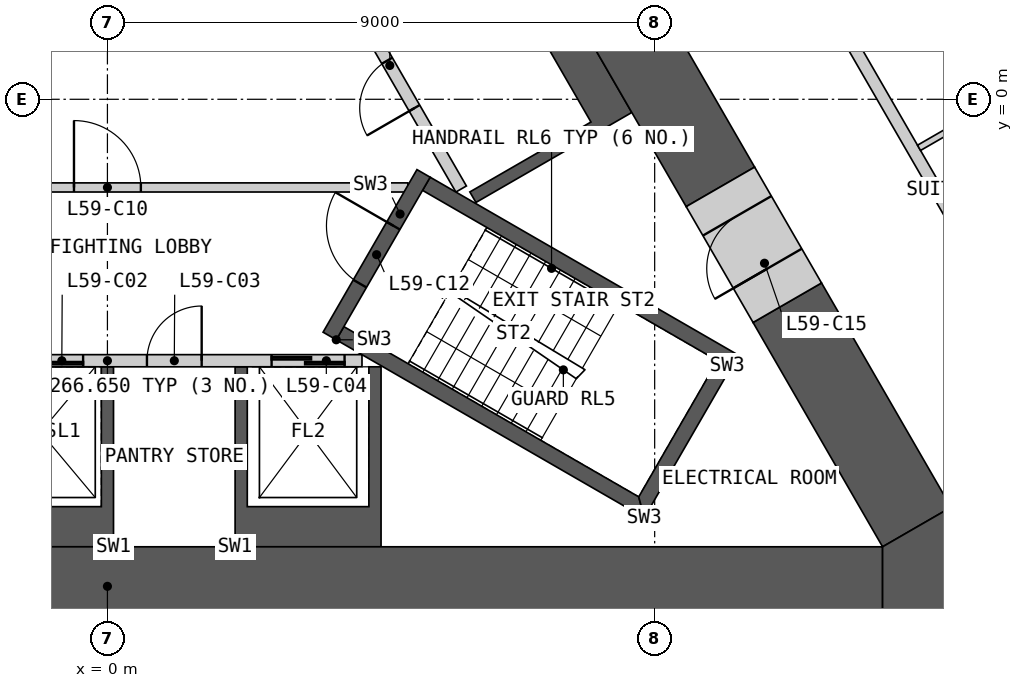
"""IFC4 building model, lengths in metres.
Left out: names, types, materials, properties, quantities, classifications, styles, units other than length and angle.
Written with IfcOpenShell. Run it as: python <this file> out.ifc"""

import sys

from ifc_helpers import new_model, si_unit, direction, frame, frame_2d, origin, place, context, subcontext, project, spatial, polyline, rectangle, outline, extrude, element, fill, save


model = new_model("IFC4")
c1 = context("Model", 3, precision=1e-05, world=origin(), true_north=direction((0.0, 1.0)))
c2 = subcontext(c1, "Body", "Model", "MODEL_VIEW")
j1 = project(units=[si_unit("LENGTHUNIT", "METRE"), si_unit("PLANEANGLEUNIT", "RADIAN")], contexts=[c1])
p1 = place(None, origin())
s1 = spatial("IfcSite", under=j1, at=p1, CompositionType="ELEMENT")
p2 = place(p1, origin())
s2 = spatial("IfcBuilding", under=s1, at=p2, CompositionType="ELEMENT")
p3 = place(p2, frame((0.0, 0.0, 263.4)))
s3 = spatial("IfcBuildingStorey", under=s2, at=p3, CompositionType="ELEMENT", Elevation=263.4)
p4 = place(p3, origin())
e1 = element("IfcWall", 1, at=p4, inside=s3, PredefinedType="SHEAR", context=c2, shape_type="SweptSolid", body=[
    extrude(outline(polyline([(0.1, -7.36), (-4.5, -7.36), (-4.5, -4.4), (-4.3, -4.4), (-4.3, -6.7), (-2.3, -6.7), (-2.3, -4.4), (-2.1, -4.4), (-2.1, -6.7), (-0.1, -6.7), (-0.1, -4.4), (0.1, -4.4), (0.1, -7.36)])), origin(), (0.0, 0.0, 1.0), 3.25),
])
p5 = place(p3, origin())
e2 = element("IfcWall", 2, at=p5, inside=s3, PredefinedType="SHEAR", context=c2, shape_type="SweptSolid", body=[
    extrude(outline(polyline([(2.1, -7.36), (2.1, -4.4), (2.3, -4.4), (2.3, -6.7), (4.3, -6.7), (4.3, -4.4), (4.5, -4.4), (4.5, -7.36), (2.1, -7.36)])), origin(), (0.0, 0.0, 1.0), 3.25),
])
p6 = place(p3, frame((-4.187, -4.3, 0.0), z_axis=(0.0, 0.0, 1.0), x_axis=(1.0, 0.0, 0.0)))
e3 = element("IfcWall", 3, at=p6, inside=s3, PredefinedType="SOLIDWALL", context=c2, shape_type="SweptSolid", body=[
    extrude(rectangle(XDim=8.373, YDim=0.2, at=frame_2d((4.187, 0.0))), origin(), (0.0, 0.0, 1.0), 3.25),
])
p7 = place(p6, frame((0.287, 0.0, 0.0)))
e4 = element("IfcOpeningElement", 4, at=p7, cuts=e3, PredefinedType="OPENING", context=c2, shape_type="SweptSolid", body=[
    extrude(rectangle(XDim=1.2, YDim=2.1, at=frame_2d((0.6, 1.05))), frame((0.0, 0.11, 0.0), z_axis=(0.0, -1.0, 0.0), x_axis=(1.0, 0.0, 0.0)), (0.0, 0.0, 1.0), 0.22),
])
p8 = place(p6, frame((2.387, 0.0, 0.0)))
e5 = element("IfcOpeningElement", 5, at=p8, cuts=e3, PredefinedType="OPENING", context=c2, shape_type="SweptSolid", body=[
    extrude(rectangle(XDim=1.4, YDim=2.1, at=frame_2d((0.7, 1.05))), frame((0.0, 0.11, 0.0), z_axis=(0.0, -1.0, 0.0), x_axis=(1.0, 0.0, 0.0)), (0.0, 0.0, 1.0), 0.22),
])
p9 = place(p6, frame((4.837, 0.0, 0.0)))
e6 = element("IfcOpeningElement", 6, at=p9, cuts=e3, PredefinedType="OPENING", context=c2, shape_type="SweptSolid", body=[
    extrude(rectangle(XDim=0.9, YDim=2.1, at=frame_2d((0.45, 1.05))), frame((0.0, 0.11, 0.0), z_axis=(0.0, -1.0, 0.0), x_axis=(1.0, 0.0, 0.0)), (0.0, 0.0, 1.0), 0.22),
])
p10 = place(p6, frame((6.887, 0.0, 0.0)))
e7 = element("IfcOpeningElement", 7, at=p10, cuts=e3, PredefinedType="OPENING", context=c2, shape_type="SweptSolid", body=[
    extrude(rectangle(XDim=1.2, YDim=2.1, at=frame_2d((0.6, 1.05))), frame((0.0, 0.11, 0.0), z_axis=(0.0, -1.0, 0.0), x_axis=(1.0, 0.0, 0.0)), (0.0, 0.0, 1.0), 0.22),
])
p11 = place(p3, origin())
e8 = element("IfcWall", 8, at=p11, inside=s3, PredefinedType="SHEAR", context=c2, shape_type="SweptSolid", body=[
    extrude(outline(polyline([(6.324, 3.767), (8.624, -0.217), (8.231, -0.444), (6.061, -1.697), (5.96, -1.524), (7.952, -0.374), (5.852, 3.263), (3.861, 2.113), (3.76, 2.287), (5.931, 3.54), (6.324, 3.767)])), origin(), (0.0, 0.0, 1.0), 3.25),
])
p12 = place(p3, frame((5.817, -1.476, 0.0), z_axis=(0.0, 0.0, 1.0), x_axis=(-0.500002616675, 0.866023893041, 0.0)))
e9 = element("IfcWall", 9, at=p12, inside=s3, PredefinedType="SOLIDWALL", context=c2, shape_type="SweptSolid", body=[
    extrude(rectangle(XDim=8.373, YDim=0.2, at=frame_2d((4.187, 0.0))), origin(), (0.0, 0.0, 1.0), 3.25),
])
p13 = place(p12, frame((1.537, 0.0, 0.0)))
e10 = element("IfcOpeningElement", 10, at=p13, cuts=e9, PredefinedType="OPENING", context=c2, shape_type="SweptSolid", body=[
    extrude(rectangle(XDim=0.9, YDim=2.1, at=frame_2d((0.45, 1.05))), frame((0.0, 0.11, 0.0), z_axis=(0.0, -1.0, 0.0), x_axis=(1.0, 0.0, 0.0)), (0.0, 0.0, 1.0), 0.22),
])
p14 = place(p12, frame((4.837, 0.0, 0.0)))
e11 = element("IfcOpeningElement", 11, at=p14, cuts=e9, PredefinedType="OPENING", context=c2, shape_type="SweptSolid", body=[
    extrude(rectangle(XDim=0.9, YDim=2.1, at=frame_2d((0.45, 1.05))), frame((0.0, 0.11, 0.0), z_axis=(0.0, -1.0, 0.0), x_axis=(1.0, 0.0, 0.0)), (0.0, 0.0, 1.0), 0.22),
])
p15 = place(p12, frame((6.937, 0.0, 0.0)))
e12 = element("IfcOpeningElement", 12, at=p15, cuts=e9, PredefinedType="OPENING", context=c2, shape_type="SweptSolid", body=[
    extrude(rectangle(XDim=1.1, YDim=2.1, at=frame_2d((0.55, 1.05))), frame((0.0, 0.11, 0.0), z_axis=(0.0, -1.0, 0.0), x_axis=(1.0, 0.0, 0.0)), (0.0, 0.0, 1.0), 0.22),
])
p16 = place(p3, frame((-4.941, -1.45, 0.0), z_axis=(0.0, 0.0, 1.0), x_axis=(1.0, 0.0, 0.0)))
e13 = element("IfcWall", 13, at=p16, inside=s3, PredefinedType="PARTITIONING", context=c2, shape_type="SweptSolid", body=[
    extrude(rectangle(XDim=9.882, YDim=0.15, at=frame_2d((4.941, 0.0))), origin(), (0.0, 0.0, 1.0), 3.25),
])
p17 = place(p16, frame((4.391, 0.0, 0.0)))
e14 = element("IfcOpeningElement", 14, at=p17, cuts=e13, PredefinedType="OPENING", context=c2, shape_type="SweptSolid", body=[
    extrude(rectangle(XDim=1.1, YDim=2.1, at=frame_2d((0.55, 1.05))), frame((0.0, 0.085, 0.0), z_axis=(0.0, -1.0, 0.0), x_axis=(1.0, 0.0, 0.0)), (0.0, 0.0, 1.0), 0.17),
])
p18 = place(p3, origin())
e15 = element("IfcWall", 15, at=p18, inside=s3, PredefinedType="SHEAR", context=c2, shape_type="SweptSolid", body=[
    extrude(outline(polyline([(3.763, -3.956), (8.83, -6.881), (8.738, -6.539), (3.888, -3.739), (3.763, -3.956)])), origin(), (0.0, 0.0, 1.0), 3.25),
])
p19 = place(p3, origin())
e16 = element("IfcWall", 16, at=p19, inside=s3, PredefinedType="SHEAR", context=c2, shape_type="SweptSolid", body=[
    extrude(outline(polyline([(8.83, -6.881), (10.374, -4.206), (10.032, -4.298), (8.738, -6.539), (8.83, -6.881)])), origin(), (0.0, 0.0, 1.0), 3.25),
])
p20 = place(p3, origin())
e17 = element("IfcWall", 17, at=p20, inside=s3, PredefinedType="SHEAR", context=c2, shape_type="SweptSolid", body=[
    extrude(outline(polyline([(10.032, -4.298), (10.374, -4.206), (5.307, -1.281), (5.182, -1.498), (10.032, -4.298)])), origin(), (0.0, 0.0, 1.0), 3.25),
])
p21 = place(p3, frame((3.655, -3.893, 0.0), z_axis=(0.0, 0.0, 1.0), x_axis=(0.499982516597, 0.866035497597, 0.0)))
e18 = element("IfcWall", 18, at=p21, inside=s3, PredefinedType="SHEAR", context=c2, shape_type="SweptSolid", body=[
    extrude(rectangle(XDim=3.088, YDim=0.25, at=frame_2d((1.544, 0.0))), origin(), (0.0, 0.0, 1.0), 3.25),
])
p22 = place(p21, frame((0.994, 0.0, 0.0)))
e19 = element("IfcOpeningElement", 19, at=p22, cuts=e18, PredefinedType="OPENING", context=c2, shape_type="SweptSolid", body=[
    extrude(rectangle(XDim=1.1, YDim=2.1, at=frame_2d((0.55, 1.05))), frame((0.0, 0.135, 0.0), z_axis=(0.0, -1.0, 0.0), x_axis=(1.0, 0.0, 0.0)), (0.0, 0.0, 1.0), 0.27),
])
p23 = place(p3, frame((-12.748, -8.01, 0.0), z_axis=(0.0, 0.0, 1.0), x_axis=(1.0, 0.0, 0.0)))
e20 = element("IfcWall", 20, at=p23, inside=s3, PredefinedType="SHEAR", context=c2, shape_type="SweptSolid", body=[
    extrude(rectangle(XDim=25.497, YDim=1.3, at=frame_2d((12.748, 0.0))), origin(), (0.0, 0.0, 1.0), 3.25),
])
p24 = place(p3, frame((10.081, -1.441, 0.0), z_axis=(0.0, 0.0, 1.0), x_axis=(-0.500012180433, 0.866018371294, 0.0)))
e21 = element("IfcWall", 21, at=p24, inside=s3, PredefinedType="SHEAR", context=c2, shape_type="SweptSolid", body=[
    extrude(rectangle(XDim=15.05, YDim=1.3, at=frame_2d((7.525, 0.0))), origin(), (0.0, 0.0, 1.0), 3.25),
])
p25 = place(p3, frame((13.311, -7.035, 0.0), z_axis=(0.0, 0.0, 1.0), x_axis=(-0.500003555838, 0.866023350811, 0.0)))
e22 = element("IfcWall", 22, at=p25, inside=s3, PredefinedType="SHEAR", context=c2, shape_type="SweptSolid", body=[
    extrude(rectangle(XDim=4.26, YDim=1.3, at=frame_2d((2.13, 0.0))), origin(), (0.0, 0.0, 1.0), 3.25),
])
p26 = place(p3, origin())
e23 = element("IfcWall", 23, at=p26, inside=s3, PredefinedType="SHEAR", context=c2, shape_type="SweptSolid", body=[
    extrude(outline(polyline([(12.748, -8.66), (12.748, -7.36), (13.874, -6.71), (15.0, -8.66), (12.748, -8.66)])), origin(), (0.0, 0.0, 1.0), 3.25),
])
p27 = place(p3, frame((11.181, -3.346, 0.0), z_axis=(0.0, 0.0, 1.0), x_axis=(-0.499946605688, 0.86605622881, 0.0)))
e24 = element("IfcWall", 24, at=p27, inside=s3, PredefinedType="SHEAR", context=c2, shape_type="SweptSolid", body=[
    extrude(rectangle(XDim=2.2, YDim=1.3, at=frame_2d((1.1, 0.0))), origin(), (0.0, 0.0, 1.0), 3.25),
])
p28 = place(p27, frame((0.65, 0.0, 0.0)))
e25 = element("IfcOpeningElement", 25, at=p28, cuts=e24, PredefinedType="OPENING", context=c2, shape_type="SweptSolid", body=[
    extrude(rectangle(XDim=1.0, YDim=2.1, at=frame_2d((0.5, 1.05))), frame((0.0, 0.66, 0.0), z_axis=(0.0, -1.0, 0.0), x_axis=(1.0, 0.0, 0.0)), (0.0, 0.0, 1.0), 1.32),
])
p29 = place(p3, frame((9.699, 5.321, 0.0), z_axis=(0.0, 0.0, 1.0), x_axis=(0.49998193945, -0.866035830797, 0.0)))
e26 = element("IfcWall", 26, at=p29, inside=s3, PredefinedType="PARTITIONING", context=c2, shape_type="SweptSolid", body=[
    extrude(rectangle(XDim=9.094, YDim=0.2, at=frame_2d((4.547, 0.0))), origin(), (0.0, 0.0, 1.0), 3.25),
])
p30 = place(p29, frame((1.162, 0.0, 0.0)))
e27 = element("IfcOpeningElement", 27, at=p30, cuts=e26, PredefinedType="OPENING", context=c2, shape_type="SweptSolid", body=[
    extrude(rectangle(XDim=1.1, YDim=2.1, at=frame_2d((0.55, 1.05))), frame((0.0, 0.11, 0.0), z_axis=(0.0, -1.0, 0.0), x_axis=(1.0, 0.0, 0.0)), (0.0, 0.0, 1.0), 0.22),
])
p31 = place(p3, frame((13.348, -0.799, 0.0), z_axis=(0.0, 0.0, 1.0), x_axis=(0.866014668023, 0.500018594424, 0.0)))
e28 = element("IfcWall", 28, at=p31, inside=s3, PredefinedType="PARTITIONING", context=c2, shape_type="SweptSolid", body=[
    extrude(rectangle(XDim=2.45, YDim=0.1, at=frame_2d((1.225, 0.0))), origin(), (0.0, 0.0, 1.0), 2.404),
])
p32 = place(p8, origin())
e29 = element("IfcDoor", 29, at=p32, inside=s3, OperationType="SLIDING_TO_LEFT", PredefinedType="DOOR", context=c2, shape_type="SweptSolid", body=[
    extrude(rectangle(XDim=1.4, YDim=2.1, at=frame_2d((0.7, 1.05))), frame((0.0, 0.025, 0.0), z_axis=(0.0, -1.0, 0.0), x_axis=(1.0, 0.0, 0.0)), (0.0, 0.0, 1.0), 0.05),
])
fill(e5, e29)
p33 = place(p9, origin())
e30 = element("IfcDoor", 30, at=p33, inside=s3, OperationType="SINGLE_SWING_RIGHT", PredefinedType="DOOR", context=c2, shape_type="SweptSolid", body=[
    extrude(rectangle(XDim=0.9, YDim=2.1, at=frame_2d((0.45, 1.05))), frame((0.0, 0.025, 0.0), z_axis=(0.0, -1.0, 0.0), x_axis=(1.0, 0.0, 0.0)), (0.0, 0.0, 1.0), 0.05),
])
fill(e6, e30)
p34 = place(p10, origin())
e31 = element("IfcDoor", 31, at=p34, inside=s3, OperationType="SLIDING_TO_LEFT", PredefinedType="DOOR", context=c2, shape_type="SweptSolid", body=[
    extrude(rectangle(XDim=1.2, YDim=2.1, at=frame_2d((0.6, 1.05))), frame((0.0, 0.025, 0.0), z_axis=(0.0, -1.0, 0.0), x_axis=(1.0, 0.0, 0.0)), (0.0, 0.0, 1.0), 0.05),
])
fill(e7, e31)
p35 = place(p13, origin())
e32 = element("IfcDoor", 32, at=p35, inside=s3, OperationType="SINGLE_SWING_LEFT", PredefinedType="DOOR", context=c2, shape_type="SweptSolid", body=[
    extrude(rectangle(XDim=0.9, YDim=2.1, at=frame_2d((0.45, 1.05))), frame((0.0, 0.025, 0.0), z_axis=(0.0, -1.0, 0.0), x_axis=(1.0, 0.0, 0.0)), (0.0, 0.0, 1.0), 0.05),
])
fill(e10, e32)
p36 = place(p17, origin())
e33 = element("IfcDoor", 33, at=p36, inside=s3, OperationType="SINGLE_SWING_LEFT", PredefinedType="DOOR", context=c2, shape_type="SweptSolid", body=[
    extrude(rectangle(XDim=1.1, YDim=2.1, at=frame_2d((0.55, 1.05))), frame((0.0, 0.025, 0.0), z_axis=(0.0, -1.0, 0.0), x_axis=(1.0, 0.0, 0.0)), (0.0, 0.0, 1.0), 0.05),
])
fill(e14, e33)
p37 = place(p22, origin())
e34 = element("IfcDoor", 34, at=p37, inside=s3, OperationType="SINGLE_SWING_RIGHT", PredefinedType="DOOR", context=c2, shape_type="SweptSolid", body=[
    extrude(rectangle(XDim=1.1, YDim=2.1, at=frame_2d((0.55, 1.05))), frame((0.0, 0.025, 0.0), z_axis=(0.0, -1.0, 0.0), x_axis=(1.0, 0.0, 0.0)), (0.0, 0.0, 1.0), 0.05),
])
fill(e19, e34)
p38 = place(p28, origin())
e35 = element("IfcDoor", 35, at=p38, inside=s3, OperationType="SINGLE_SWING_LEFT", PredefinedType="DOOR", context=c2, shape_type="SweptSolid", body=[
    extrude(rectangle(XDim=1.0, YDim=2.1, at=frame_2d((0.5, 1.05))), frame((0.0, 0.405, 0.0), z_axis=(0.0, -1.0, 0.0), x_axis=(1.0, 0.0, 0.0)), (0.0, 0.0, 1.0), 0.05),
])
fill(e25, e35)
save(model, sys.argv[1])
